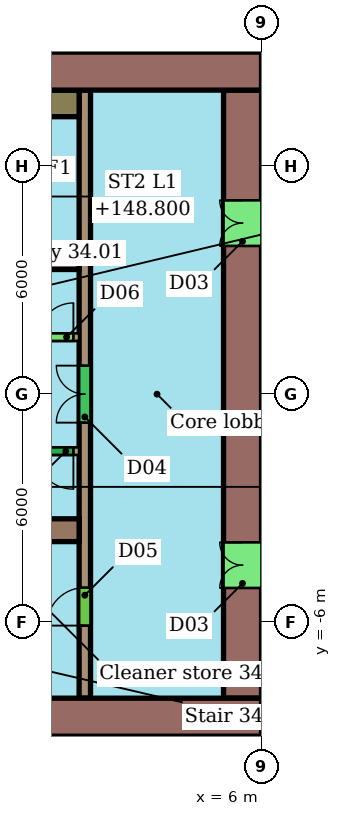
"""IFC4 building model, lengths in metres.
Left out: names, types, materials, properties, quantities, classifications, styles, units other than length and angle.
Written with IfcOpenShell. Run it as: python <this file> out.ifc"""

import sys

from ifc_helpers import new_model, si_unit, direction, frame, frame_2d, origin, place, context, subcontext, project, spatial, rectangle, extrude, element, fill, save


model = new_model("IFC4")
c1 = context("Model", 3, precision=1e-05, world=origin(), true_north=direction((0.0, 1.0)))
c2 = subcontext(c1, "Body", "Model", "MODEL_VIEW")
j1 = project(units=[si_unit("LENGTHUNIT", "METRE"), si_unit("PLANEANGLEUNIT", "RADIAN")], contexts=[c1])
p1 = place(None, origin())
s1 = spatial("IfcSite", under=j1, at=p1, CompositionType="ELEMENT")
p2 = place(p1, origin())
s2 = spatial("IfcBuilding", under=s1, at=p2, CompositionType="ELEMENT")
p3 = place(p2, frame((0.0, 0.0, 147.0)))
s3 = spatial("IfcBuildingStorey", under=s2, at=p3, CompositionType="ELEMENT", Elevation=147.0)
p4 = place(p3, frame((6.0, 8.5, 0.0), z_axis=(0.0, 0.0, 1.0), x_axis=(-1.0, 0.0, 0.0)))
e1 = element("IfcWall", 1, at=p4, inside=s3, PredefinedType="SHEAR", context=c2, shape_type="SweptSolid", body=[
    extrude(rectangle(XDim=12.0, YDim=1.0, at=frame_2d((6.0, 0.0))), origin(), (0.0, 0.0, 1.0), 3.3),
])
p5 = place(p4, frame((5.6, 0.0, 0.0)))
e2 = element("IfcOpeningElement", 2, at=p5, cuts=e1, PredefinedType="OPENING", context=c2, shape_type="SweptSolid", body=[
    extrude(rectangle(XDim=1.2, YDim=2.1, at=frame_2d((0.6, 1.05))), frame((0.0, 0.51, 0.0), z_axis=(0.0, -1.0, 0.0), x_axis=(1.0, 0.0, 0.0)), (0.0, 0.0, 1.0), 1.02),
])
p6 = place(p3, frame((-18.0, -8.5, 0.0), z_axis=(0.0, 0.0, 1.0), x_axis=(1.0, 0.0, 0.0)))
e3 = element("IfcWall", 3, at=p6, inside=s3, PredefinedType="SHEAR", context=c2, shape_type="SweptSolid", body=[
    extrude(rectangle(XDim=24.0, YDim=1.0, at=frame_2d((12.0, 0.0))), origin(), (0.0, 0.0, 1.0), 3.3),
])
p7 = place(p6, frame((6.0, 0.0, 0.0)))
e4 = element("IfcOpeningElement", 4, at=p7, cuts=e3, PredefinedType="OPENING", context=c2, shape_type="SweptSolid", body=[
    extrude(rectangle(XDim=1.2, YDim=2.1, at=frame_2d((0.6, 1.05))), frame((0.0, 0.51, 0.0), z_axis=(0.0, -1.0, 0.0), x_axis=(1.0, 0.0, 0.0)), (0.0, 0.0, 1.0), 1.02),
])
p8 = place(p3, frame((5.5, -8.0, 0.0), z_axis=(0.0, 0.0, 1.0), x_axis=(0.0, 1.0, 0.0)))
e5 = element("IfcWall", 5, at=p8, inside=s3, PredefinedType="SHEAR", context=c2, shape_type="SweptSolid", body=[
    extrude(rectangle(XDim=16.0, YDim=1.0, at=frame_2d((8.0, 0.0))), origin(), (0.0, 0.0, 1.0), 3.3),
])
p9 = place(p8, frame((2.9, 0.0, 0.0)))
e6 = element("IfcOpeningElement", 6, at=p9, cuts=e5, PredefinedType="OPENING", context=c2, shape_type="SweptSolid", body=[
    extrude(rectangle(XDim=1.2, YDim=2.1, at=frame_2d((0.6, 1.05))), frame((0.0, 0.51, 0.0), z_axis=(0.0, -1.0, 0.0), x_axis=(1.0, 0.0, 0.0)), (0.0, 0.0, 1.0), 1.02),
])
p10 = place(p8, frame((11.9, 0.0, 0.0)))
e7 = element("IfcOpeningElement", 7, at=p10, cuts=e5, PredefinedType="OPENING", context=c2, shape_type="SweptSolid", body=[
    extrude(rectangle(XDim=1.2, YDim=2.1, at=frame_2d((0.6, 1.05))), frame((0.0, 0.51, 0.0), z_axis=(0.0, -1.0, 0.0), x_axis=(1.0, 0.0, 0.0)), (0.0, 0.0, 1.0), 1.02),
])
for number, where, z_axis, x_axis in (
    (8, (-6.0, 3.58, 0.0), (0.0, 0.0, 1.0), (1.0, 0.0, 0.0)),
    (9, (-6.0, -3.58, 0.0), (0.0, 0.0, 1.0), (1.0, 0.0, 0.0)),
):
    element("IfcWall", number, at=place(p3, frame(where, z_axis=z_axis, x_axis=x_axis)), inside=s3, PredefinedType="SHEAR", context=c2, shape_type="SweptSolid", body=[
        extrude(rectangle(XDim=7.2, YDim=0.6, at=frame_2d((3.6, 0.0))), origin(), (0.0, 0.0, 1.0), 3.3),
    ])
p11 = place(p3, frame((1.35, -8.0, 0.0), z_axis=(0.0, 0.0, 1.0), x_axis=(0.0, 1.0, 0.0)))
e10 = element("IfcWall", 10, at=p11, inside=s3, PredefinedType="SHEAR", context=c2, shape_type="SweptSolid", body=[
    extrude(rectangle(XDim=16.0, YDim=0.3, at=frame_2d((8.0, 0.0))), origin(), (0.0, 0.0, 1.0), 3.3),
])
p12 = place(p11, frame((1.91, 0.0, 0.0)))
e11 = element("IfcOpeningElement", 11, at=p12, cuts=e10, PredefinedType="OPENING", context=c2, shape_type="SweptSolid", body=[
    extrude(rectangle(XDim=1.0, YDim=2.1, at=frame_2d((0.5, 1.05))), frame((0.0, 0.16, 0.0), z_axis=(0.0, -1.0, 0.0), x_axis=(1.0, 0.0, 0.0)), (0.0, 0.0, 1.0), 0.32),
])
p13 = place(p11, frame((7.25, 0.0, 0.0)))
e12 = element("IfcOpeningElement", 12, at=p13, cuts=e10, PredefinedType="OPENING", context=c2, shape_type="SweptSolid", body=[
    extrude(rectangle(XDim=1.5, YDim=2.1, at=frame_2d((0.75, 1.05))), frame((0.0, 0.16, 0.0), z_axis=(0.0, -1.0, 0.0), x_axis=(1.0, 0.0, 0.0)), (0.0, 0.0, 1.0), 0.32),
])
p14 = place(p3, frame((-13.2, 1.5, 0.0), z_axis=(0.0, 0.0, 1.0), x_axis=(1.0, 0.0, 0.0)))
e13 = element("IfcWall", 13, at=p14, inside=s3, PredefinedType="SHEAR", context=c2, shape_type="SweptSolid", body=[
    extrude(rectangle(XDim=14.4, YDim=0.2, at=frame_2d((7.2, 0.0))), origin(), (0.0, 0.0, 1.0), 3.3),
])
p15 = place(p14, frame((0.546, 0.0, 0.0)))
e14 = element("IfcOpeningElement", 14, at=p15, cuts=e13, PredefinedType="OPENING", context=c2, shape_type="SweptSolid", body=[
    extrude(rectangle(XDim=1.1, YDim=2.1, at=frame_2d((0.55, 1.05))), frame((0.0, 0.11, 0.0), z_axis=(0.0, -1.0, 0.0), x_axis=(1.0, 0.0, 0.0)), (0.0, 0.0, 1.0), 0.22),
])
p16 = place(p14, frame((2.988, 0.0, 0.0)))
e15 = element("IfcOpeningElement", 15, at=p16, cuts=e13, PredefinedType="OPENING", context=c2, shape_type="SweptSolid", body=[
    extrude(rectangle(XDim=1.1, YDim=2.1, at=frame_2d((0.55, 1.05))), frame((0.0, 0.11, 0.0), z_axis=(0.0, -1.0, 0.0), x_axis=(1.0, 0.0, 0.0)), (0.0, 0.0, 1.0), 0.22),
])
p17 = place(p14, frame((5.429, 0.0, 0.0)))
e16 = element("IfcOpeningElement", 16, at=p17, cuts=e13, PredefinedType="OPENING", context=c2, shape_type="SweptSolid", body=[
    extrude(rectangle(XDim=1.1, YDim=2.1, at=frame_2d((0.55, 1.05))), frame((0.0, 0.11, 0.0), z_axis=(0.0, -1.0, 0.0), x_axis=(1.0, 0.0, 0.0)), (0.0, 0.0, 1.0), 0.22),
])
p18 = place(p14, frame((7.871, 0.0, 0.0)))
e17 = element("IfcOpeningElement", 17, at=p18, cuts=e13, PredefinedType="OPENING", context=c2, shape_type="SweptSolid", body=[
    extrude(rectangle(XDim=1.1, YDim=2.1, at=frame_2d((0.55, 1.05))), frame((0.0, 0.11, 0.0), z_axis=(0.0, -1.0, 0.0), x_axis=(1.0, 0.0, 0.0)), (0.0, 0.0, 1.0), 0.22),
])
p19 = place(p14, frame((10.958, 0.0, 0.0)))
e18 = element("IfcOpeningElement", 18, at=p19, cuts=e13, PredefinedType="OPENING", context=c2, shape_type="SweptSolid", body=[
    extrude(rectangle(XDim=0.9, YDim=2.1, at=frame_2d((0.45, 1.05))), frame((0.0, 0.11, 0.0), z_axis=(0.0, -1.0, 0.0), x_axis=(1.0, 0.0, 0.0)), (0.0, 0.0, 1.0), 0.22),
])
p20 = place(p14, frame((13.35, 0.0, 0.0)))
e19 = element("IfcOpeningElement", 19, at=p20, cuts=e13, PredefinedType="OPENING", context=c2, shape_type="SweptSolid", body=[
    extrude(rectangle(XDim=0.9, YDim=2.1, at=frame_2d((0.45, 1.05))), frame((0.0, 0.11, 0.0), z_axis=(0.0, -1.0, 0.0), x_axis=(1.0, 0.0, 0.0)), (0.0, 0.0, 1.0), 0.22),
])
p21 = place(p3, frame((1.2, -1.5, 0.0), z_axis=(0.0, 0.0, 1.0), x_axis=(-1.0, 0.0, 0.0)))
e20 = element("IfcWall", 20, at=p21, inside=s3, PredefinedType="SHEAR", context=c2, shape_type="SweptSolid", body=[
    extrude(rectangle(XDim=14.4, YDim=0.2, at=frame_2d((7.2, 0.0))), origin(), (0.0, 0.0, 1.0), 3.3),
])
p22 = place(p21, frame((7.821, 0.0, 0.0)))
e21 = element("IfcOpeningElement", 21, at=p22, cuts=e20, PredefinedType="OPENING", context=c2, shape_type="SweptSolid", body=[
    extrude(rectangle(XDim=1.2, YDim=2.1, at=frame_2d((0.6, 1.05))), frame((0.0, 0.11, 0.0), z_axis=(0.0, -1.0, 0.0), x_axis=(1.0, 0.0, 0.0)), (0.0, 0.0, 1.0), 0.22),
])
p23 = place(p21, frame((0.15, 0.0, 0.0)))
e22 = element("IfcOpeningElement", 22, at=p23, cuts=e20, PredefinedType="OPENING", context=c2, shape_type="SweptSolid", body=[
    extrude(rectangle(XDim=1.0, YDim=2.1, at=frame_2d((0.5, 1.05))), frame((0.0, 0.11, 0.0), z_axis=(0.0, -1.0, 0.0), x_axis=(1.0, 0.0, 0.0)), (0.0, 0.0, 1.0), 0.22),
])
p24 = place(p3, frame((0.4, 7.65, 0.0), z_axis=(0.0, 0.0, 1.0), x_axis=(1.0, 0.0, 0.0)))
e23 = element("IfcWall", 23, at=p24, inside=s3, PredefinedType="SHEAR", context=c2, shape_type="SweptSolid", body=[
    extrude(rectangle(XDim=0.8, YDim=0.7, at=frame_2d((0.4, 0.0))), origin(), (0.0, 0.0, 1.0), 3.3),
])
p25 = place(p9, origin())
e24 = element("IfcDoor", 24, at=p25, inside=s3, OperationType="DOUBLE_DOOR_SINGLE_SWING", PredefinedType="NOTDEFINED", context=c2, shape_type="SweptSolid", body=[
    extrude(rectangle(XDim=1.2, YDim=2.1, at=frame_2d((0.6, 1.05))), frame((0.0, 0.025, 0.0), z_axis=(0.0, -1.0, 0.0), x_axis=(1.0, 0.0, 0.0)), (0.0, 0.0, 1.0), 0.05),
])
fill(e6, e24)
p26 = place(p10, origin())
e25 = element("IfcDoor", 25, at=p26, inside=s3, OperationType="DOUBLE_DOOR_SINGLE_SWING", PredefinedType="NOTDEFINED", context=c2, shape_type="SweptSolid", body=[
    extrude(rectangle(XDim=1.2, YDim=2.1, at=frame_2d((0.6, 1.05))), frame((0.0, 0.025, 0.0), z_axis=(0.0, -1.0, 0.0), x_axis=(1.0, 0.0, 0.0)), (0.0, 0.0, 1.0), 0.05),
])
fill(e7, e25)
p27 = place(p12, origin())
e26 = element("IfcDoor", 26, at=p27, inside=s3, OperationType="SINGLE_SWING_LEFT", PredefinedType="NOTDEFINED", context=c2, shape_type="SweptSolid", body=[
    extrude(rectangle(XDim=1.0, YDim=2.1, at=frame_2d((0.5, 1.05))), frame((0.0, 0.025, 0.0), z_axis=(0.0, -1.0, 0.0), x_axis=(1.0, 0.0, 0.0)), (0.0, 0.0, 1.0), 0.05),
])
fill(e11, e26)
p28 = place(p13, origin())
e27 = element("IfcDoor", 27, at=p28, inside=s3, OperationType="DOUBLE_DOOR_SINGLE_SWING", PredefinedType="NOTDEFINED", context=c2, shape_type="SweptSolid", body=[
    extrude(rectangle(XDim=1.5, YDim=2.1, at=frame_2d((0.75, 1.05))), frame((0.0, 0.025, 0.0), z_axis=(0.0, -1.0, 0.0), x_axis=(1.0, 0.0, 0.0)), (0.0, 0.0, 1.0), 0.05),
])
fill(e12, e27)
p29 = place(p20, origin())
e28 = element("IfcDoor", 28, at=p29, inside=s3, OperationType="SINGLE_SWING_RIGHT", PredefinedType="NOTDEFINED", context=c2, shape_type="SweptSolid", body=[
    extrude(rectangle(XDim=0.9, YDim=2.1, at=frame_2d((0.45, 1.05))), frame((0.0, 0.025, 0.0), z_axis=(0.0, -1.0, 0.0), x_axis=(1.0, 0.0, 0.0)), (0.0, 0.0, 1.0), 0.05),
])
fill(e19, e28)
p30 = place(p23, origin())
e29 = element("IfcDoor", 29, at=p30, inside=s3, OperationType="SINGLE_SWING_LEFT", PredefinedType="NOTDEFINED", context=c2, shape_type="SweptSolid", body=[
    extrude(rectangle(XDim=1.0, YDim=2.1, at=frame_2d((0.5, 1.05))), frame((0.0, 0.025, 0.0), z_axis=(0.0, -1.0, 0.0), x_axis=(1.0, 0.0, 0.0)), (0.0, 0.0, 1.0), 0.05),
])
fill(e22, e29)
save(model, sys.argv[1])
